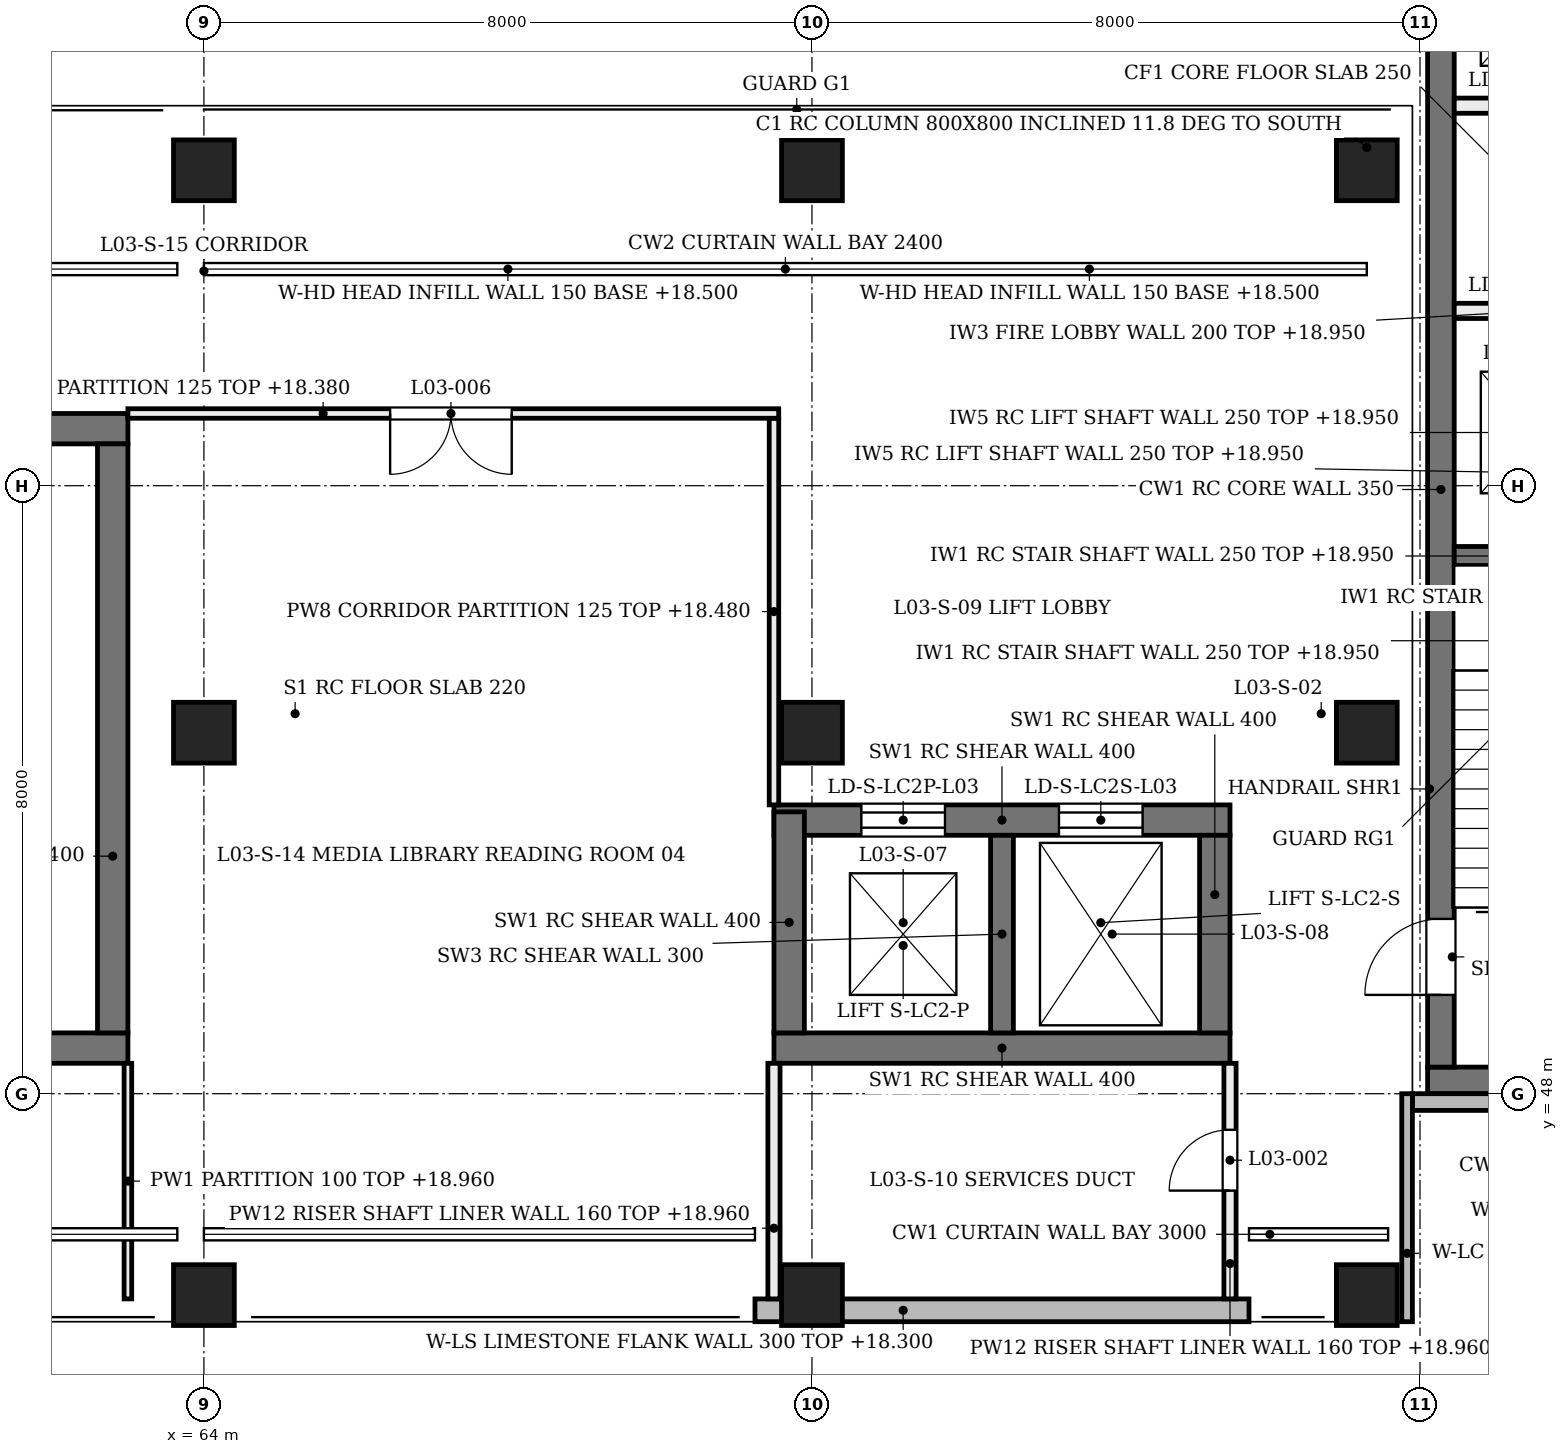
"""IFC4 building model, lengths in metres.
Left out: names, types, materials, properties, quantities, classifications, styles, units other than length and angle.
Written with IfcOpenShell. Run it as: python <this file> out.ifc"""

import sys

from ifc_helpers import new_model, si_unit, direction, frame, frame_2d, origin, origin_2d, place, context, subcontext, project, spatial, rectangle, extrude, element, fill, save


model = new_model("IFC4")
c1 = context("Model", 3, precision=1e-05, world=origin(), true_north=direction((0.0, 1.0)))
c2 = subcontext(c1, "Body", "Model", "MODEL_VIEW")
j1 = project(units=[si_unit("LENGTHUNIT", "METRE"), si_unit("PLANEANGLEUNIT", "RADIAN")], contexts=[c1])
p1 = place(None, origin())
s1 = spatial("IfcSite", under=j1, at=p1, CompositionType="ELEMENT")
p2 = place(p1, origin())
s2 = spatial("IfcBuilding", under=s1, at=p2, CompositionType="ELEMENT")
p3 = place(p2, frame((0.0, 0.0, 14.4)))
s3 = spatial("IfcBuildingStorey", under=s2, at=p3, CompositionType="ELEMENT", Elevation=14.4)
p4 = place(p3, frame((71.5, 48.6, 0.0), z_axis=(0.0, 0.0, 1.0), x_axis=(1.0, 0.0, 0.0)))
e1 = element("IfcWall", 1, at=p4, inside=s3, PredefinedType="SHEAR", context=c2, shape_type="SweptSolid", body=[
    extrude(rectangle(XDim=6.0, YDim=0.4, at=frame_2d((3.0, 0.0))), origin(), (0.0, 0.0, 1.0), 4.58),
])
p5 = place(p3, frame((71.5, 51.6, 0.0), z_axis=(0.0, 0.0, 1.0), x_axis=(1.0, 0.0, 0.0)))
e2 = element("IfcWall", 2, at=p5, inside=s3, PredefinedType="SHEAR", context=c2, shape_type="SweptSolid", body=[
    extrude(rectangle(XDim=6.0, YDim=0.4, at=frame_2d((3.0, 0.0))), origin(), (0.0, 0.0, 1.0), 4.58),
])
p6 = place(p5, frame((1.15, 0.0, 0.0)))
e3 = element("IfcOpeningElement", 3, at=p6, cuts=e2, PredefinedType="OPENING", context=c2, shape_type="SweptSolid", body=[
    extrude(rectangle(XDim=1.1, YDim=2.1, at=frame_2d((0.55, 1.05))), frame((0.0, 0.21, 0.0), z_axis=(0.0, -1.0, 0.0), x_axis=(1.0, 0.0, 0.0)), (0.0, 0.0, 1.0), 0.42),
])
p7 = place(p5, frame((3.75, 0.0, 0.0)))
e4 = element("IfcOpeningElement", 4, at=p7, cuts=e2, PredefinedType="OPENING", context=c2, shape_type="SweptSolid", body=[
    extrude(rectangle(XDim=1.1, YDim=2.1, at=frame_2d((0.55, 1.05))), frame((0.0, 0.21, 0.0), z_axis=(0.0, -1.0, 0.0), x_axis=(1.0, 0.0, 0.0)), (0.0, 0.0, 1.0), 0.42),
])
p8 = place(p3, frame((71.7, 48.8, 0.0), z_axis=(0.0, 0.0, 1.0), x_axis=(0.0, 1.0, 0.0)))
e5 = element("IfcWall", 5, at=p8, inside=s3, PredefinedType="SHEAR", context=c2, shape_type="SweptSolid", body=[
    extrude(rectangle(XDim=2.908, YDim=0.4, at=frame_2d((1.454, 0.0))), origin(), (0.0, 0.0, 1.0), 4.58),
])
p9 = place(p3, frame((77.3, 48.8, 0.0), z_axis=(0.0, 0.0, 1.0), x_axis=(0.0, 1.0, 0.0)))
e6 = element("IfcWall", 6, at=p9, inside=s3, PredefinedType="SHEAR", context=c2, shape_type="SweptSolid", body=[
    extrude(rectangle(XDim=2.6, YDim=0.4, at=frame_2d((1.3, 0.0))), origin(), (0.0, 0.0, 1.0), 4.58),
])
p10 = place(p3, frame((74.5, 48.8, 0.0), z_axis=(0.0, 0.0, 1.0), x_axis=(0.0, 1.0, 0.0)))
e7 = element("IfcWall", 7, at=p10, inside=s3, PredefinedType="SHEAR", context=c2, shape_type="SweptSolid", body=[
    extrude(rectangle(XDim=2.6, YDim=0.3, at=frame_2d((1.3, 0.0))), origin(), (0.0, 0.0, 1.0), 4.58),
])
p11 = place(p3, frame((41.0, 48.6, 0.0), z_axis=(0.0, 0.0, 1.0), x_axis=(1.0, 0.0, 0.0)))
e8 = element("IfcWall", 8, at=p11, inside=s3, PredefinedType="SHEAR", context=c2, shape_type="SweptSolid", body=[
    extrude(rectangle(XDim=22.0, YDim=0.4, at=frame_2d((11.0, 0.0))), origin(), (0.0, 0.0, 1.0), 4.58),
])
p12 = place(p3, frame((41.0, 56.75, 0.0), z_axis=(0.0, 0.0, 1.0), x_axis=(1.0, 0.0, 0.0)))
e9 = element("IfcWall", 9, at=p12, inside=s3, PredefinedType="SHEAR", context=c2, shape_type="SweptSolid", body=[
    extrude(rectangle(XDim=22.0, YDim=0.4, at=frame_2d((11.0, 0.0))), origin(), (0.0, 0.0, 1.0), 4.58),
])
p13 = place(p12, frame((10.366, 0.0, 0.0)))
e10 = element("IfcOpeningElement", 10, at=p13, cuts=e9, PredefinedType="OPENING", context=c2, shape_type="SweptSolid", body=[
    extrude(rectangle(XDim=1.5, YDim=2.1, at=frame_2d((0.75, 1.05))), frame((0.0, 0.21, 0.0), z_axis=(0.0, -1.0, 0.0), x_axis=(1.0, 0.0, 0.0)), (0.0, 0.0, 1.0), 0.42),
])
p14 = place(p3, frame((62.8, 48.8, 0.0), z_axis=(0.0, 0.0, 1.0), x_axis=(0.0, 1.0, 0.0)))
e11 = element("IfcWall", 11, at=p14, inside=s3, PredefinedType="SHEAR", context=c2, shape_type="SweptSolid", body=[
    extrude(rectangle(XDim=7.75, YDim=0.4, at=frame_2d((3.875, 0.0))), origin(), (0.0, 0.0, 1.0), 4.58),
])
p15 = place(p3, frame((80.1, 48.175, 0.0), z_axis=(0.0, 0.0, 1.0), x_axis=(1.0, 0.0, 0.0)))
e12 = element("IfcWall", 12, at=p15, inside=s3, PredefinedType="SHEAR", context=c2, shape_type="SweptSolid", body=[
    extrude(rectangle(XDim=7.95, YDim=0.35, at=frame_2d((3.975, 0.0))), origin(), (0.0, 0.0, 1.0), 4.58),
])
p16 = place(p3, frame((80.275, 48.35, 0.0), z_axis=(0.0, 0.0, 1.0), x_axis=(0.0, 1.0, 0.0)))
e13 = element("IfcWall", 13, at=p16, inside=s3, PredefinedType="SHEAR", context=c2, shape_type="SweptSolid", body=[
    extrude(rectangle(XDim=15.2, YDim=0.35, at=frame_2d((7.6, 0.0))), origin(), (0.0, 0.0, 1.0), 4.58),
])
p17 = place(p16, frame((0.95, 0.0, 0.0)))
e14 = element("IfcOpeningElement", 14, at=p17, cuts=e13, PredefinedType="OPENING", context=c2, shape_type="SweptSolid", body=[
    extrude(rectangle(XDim=1.0, YDim=2.1, at=frame_2d((0.5, 1.05))), frame((0.0, 0.185, 0.0), z_axis=(0.0, -1.0, 0.0), x_axis=(1.0, 0.0, 0.0)), (0.0, 0.0, 1.0), 0.37),
])
for number, where, z_axis, x_axis in (
    (15, (64.0, 45.6, 0.0), (0.0, -0.204, 0.979), (1.0, 0.0, 0.0)),
    (16, (72.0, 45.6, 0.0), (0.0, -0.204, 0.979), (1.0, 0.0, 0.0)),
    (17, (79.3, 45.6, 0.0), (0.0, -0.204, 0.979), (1.0, 0.0, 0.0)),
    (18, (64.0, 53.0, 0.0), (0.0, -0.204, 0.979), (1.0, 0.0, 0.0)),
    (19, (72.0, 53.0, 0.0), (0.0, -0.204, 0.979), (1.0, 0.0, 0.0)),
    (20, (79.3, 53.0, 0.0), (0.0, -0.204, 0.979), (1.0, 0.0, 0.0)),
    (21, (64.0, 60.4, 0.0), (0.0, -0.204, 0.979), (1.0, 0.0, 0.0)),
    (22, (72.0, 60.4, 0.0), (0.0, -0.204, 0.979), (1.0, 0.0, 0.0)),
    (23, (79.3, 60.4, 0.0), (0.0, -0.204, 0.979), (1.0, 0.0, 0.0)),
):
    element("IfcColumn", number, at=place(p3, frame(where, z_axis=z_axis, x_axis=x_axis)), inside=s3, PredefinedType="COLUMN", context=c2, shape_type="SweptSolid", body=[
        extrude(rectangle(XDim=0.8, YDim=0.8, at=origin_2d()), origin(), (0.0, 0.0, 1.0), 4.903),
    ])
p18 = place(p3, frame((71.25, 45.15, 0.0), z_axis=(0.0, 0.0, 1.0), x_axis=(1.0, 0.0, 0.0)))
e24 = element("IfcWall", 24, at=p18, inside=s3, PredefinedType="SOLIDWALL", context=c2, shape_type="SweptSolid", body=[
    extrude(rectangle(XDim=6.5, YDim=0.3, at=frame_2d((3.25, 0.0))), origin(), (0.0, 0.0, 1.0), 3.9),
])
p19 = place(p3, frame((64.2, 58.85, 4.1), z_axis=(0.0, 0.0, 1.0), x_axis=(1.0, 0.0, 0.0)))
e25 = element("IfcWall", 25, at=p19, inside=s3, PredefinedType="SOLIDWALL", context=c2, shape_type="SweptSolid", body=[
    extrude(rectangle(XDim=7.6, YDim=0.15, at=frame_2d((3.8, 0.0))), origin(), (0.0, 0.0, 1.0), 0.48),
])
p20 = place(p3, frame((72.2, 58.85, 4.1), z_axis=(0.0, 0.0, 1.0), x_axis=(1.0, 0.0, 0.0)))
e26 = element("IfcWall", 26, at=p20, inside=s3, PredefinedType="SOLIDWALL", context=c2, shape_type="SweptSolid", body=[
    extrude(rectangle(XDim=6.9, YDim=0.15, at=frame_2d((3.45, 0.0))), origin(), (0.0, 0.0, 1.0), 0.48),
])
p21 = place(p3, frame((79.9, 47.89, 0.0), z_axis=(0.0, 0.0, 1.0), x_axis=(1.0, 0.0, 0.0)))
e27 = element("IfcWall", 27, at=p21, inside=s3, PredefinedType="SOLIDWALL", context=c2, shape_type="SweptSolid", body=[
    extrude(rectangle(XDim=8.2, YDim=0.22, at=frame_2d((4.1, 0.0))), origin(), (0.0, 0.0, 1.0), 3.9),
])
p22 = place(p21, frame((1.308, 0.0, 0.9)))
e28 = element("IfcOpeningElement", 28, at=p22, cuts=e27, PredefinedType="OPENING", context=c2, shape_type="SweptSolid", body=[
    extrude(rectangle(XDim=0.45, YDim=2.6, at=frame_2d((0.225, 1.3))), frame((0.0, 0.12, 0.0), z_axis=(0.0, -1.0, 0.0), x_axis=(1.0, 0.0, 0.0)), (0.0, 0.0, 1.0), 0.24),
])
p23 = place(p21, frame((3.975, 0.0, 0.9)))
e29 = element("IfcOpeningElement", 29, at=p23, cuts=e27, PredefinedType="OPENING", context=c2, shape_type="SweptSolid", body=[
    extrude(rectangle(XDim=0.45, YDim=2.6, at=frame_2d((0.225, 1.3))), frame((0.0, 0.12, 0.0), z_axis=(0.0, -1.0, 0.0), x_axis=(1.0, 0.0, 0.0)), (0.0, 0.0, 1.0), 0.24),
])
p24 = place(p21, frame((6.642, 0.0, 0.9)))
e30 = element("IfcOpeningElement", 30, at=p24, cuts=e27, PredefinedType="OPENING", context=c2, shape_type="SweptSolid", body=[
    extrude(rectangle(XDim=0.45, YDim=2.6, at=frame_2d((0.225, 1.3))), frame((0.0, 0.12, 0.0), z_axis=(0.0, -1.0, 0.0), x_axis=(1.0, 0.0, 0.0)), (0.0, 0.0, 1.0), 0.24),
])
p25 = place(p3, frame((79.83, 45.0, 0.0), z_axis=(0.0, 0.0, 1.0), x_axis=(0.0, 1.0, 0.0)))
e31 = element("IfcWall", 31, at=p25, inside=s3, PredefinedType="SOLIDWALL", context=c2, shape_type="SweptSolid", body=[
    extrude(rectangle(XDim=3.0, YDim=0.14, at=frame_2d((1.5, 0.0))), origin(), (0.0, 0.0, 1.0), 3.9),
])
p26 = place(p3, frame((83.55, 55.075, 0.0), z_axis=(0.0, 0.0, 1.0), x_axis=(-1.0, 0.0, 0.0)))
e32 = element("IfcWall", 32, at=p26, inside=s3, PredefinedType="SOLIDWALL", context=c2, shape_type="SweptSolid", body=[
    extrude(rectangle(XDim=3.1, YDim=0.25, at=frame_2d((1.55, 0.0))), origin(), (0.0, 0.0, 1.0), 4.55),
])
p27 = place(p3, frame((87.65, 58.3, 0.0), z_axis=(0.0, 0.0, 1.0), x_axis=(-1.0, 0.0, 0.0)))
e33 = element("IfcWall", 33, at=p27, inside=s3, PredefinedType="SOLIDWALL", context=c2, shape_type="SweptSolid", body=[
    extrude(rectangle(XDim=7.2, YDim=0.2, at=frame_2d((3.6, 0.0))), origin(), (0.0, 0.0, 1.0), 4.55),
])
p28 = place(p27, frame((0.5, 0.0, 0.0)))
e34 = element("IfcOpeningElement", 34, at=p28, cuts=e33, PredefinedType="OPENING", context=c2, shape_type="SweptSolid", body=[
    extrude(rectangle(XDim=1.1, YDim=2.1, at=frame_2d((0.55, 1.05))), frame((0.0, 0.11, 0.0), z_axis=(0.0, -1.0, 0.0), x_axis=(1.0, 0.0, 0.0)), (0.0, 0.0, 1.0), 0.22),
])
p29 = place(p27, frame((5.6, 0.0, 0.0)))
e35 = element("IfcOpeningElement", 35, at=p29, cuts=e33, PredefinedType="OPENING", context=c2, shape_type="SweptSolid", body=[
    extrude(rectangle(XDim=1.1, YDim=2.1, at=frame_2d((0.55, 1.05))), frame((0.0, 0.11, 0.0), z_axis=(0.0, -1.0, 0.0), x_axis=(1.0, 0.0, 0.0)), (0.0, 0.0, 1.0), 0.22),
])
p30 = place(p27, frame((3.1, 0.0, 0.0)))
e36 = element("IfcOpeningElement", 36, at=p30, cuts=e33, PredefinedType="OPENING", context=c2, shape_type="SweptSolid", body=[
    extrude(rectangle(XDim=1.0, YDim=2.1, at=frame_2d((0.5, 1.05))), frame((0.0, 0.11, 0.0), z_axis=(0.0, -1.0, 0.0), x_axis=(1.0, 0.0, 0.0)), (0.0, 0.0, 1.0), 0.22),
])
p31 = place(p3, frame((87.65, 61.0, 0.0), z_axis=(0.0, 0.0, 1.0), x_axis=(-1.0, 0.0, 0.0)))
e37 = element("IfcWall", 37, at=p31, inside=s3, PredefinedType="SOLIDWALL", context=c2, shape_type="SweptSolid", body=[
    extrude(rectangle(XDim=7.2, YDim=0.2, at=frame_2d((3.6, 0.0))), origin(), (0.0, 0.0, 1.0), 4.55),
])
p32 = place(p31, frame((0.5, 0.0, 0.0)))
e38 = element("IfcOpeningElement", 38, at=p32, cuts=e37, PredefinedType="OPENING", context=c2, shape_type="SweptSolid", body=[
    extrude(rectangle(XDim=1.1, YDim=2.1, at=frame_2d((0.55, 1.05))), frame((0.0, 0.11, 0.0), z_axis=(0.0, -1.0, 0.0), x_axis=(1.0, 0.0, 0.0)), (0.0, 0.0, 1.0), 0.22),
])
p33 = place(p31, frame((5.6, 0.0, 0.0)))
e39 = element("IfcOpeningElement", 39, at=p33, cuts=e37, PredefinedType="OPENING", context=c2, shape_type="SweptSolid", body=[
    extrude(rectangle(XDim=1.1, YDim=2.1, at=frame_2d((0.55, 1.05))), frame((0.0, 0.11, 0.0), z_axis=(0.0, -1.0, 0.0), x_axis=(1.0, 0.0, 0.0)), (0.0, 0.0, 1.0), 0.22),
])
p34 = place(p31, frame((3.1, 0.0, 0.0)))
e40 = element("IfcOpeningElement", 40, at=p34, cuts=e37, PredefinedType="OPENING", context=c2, shape_type="SweptSolid", body=[
    extrude(rectangle(XDim=1.0, YDim=2.1, at=frame_2d((0.5, 1.05))), frame((0.0, 0.11, 0.0), z_axis=(0.0, -1.0, 0.0), x_axis=(1.0, 0.0, 0.0)), (0.0, 0.0, 1.0), 0.22),
])
p35 = place(p3, frame((77.5, 45.3, 0.0), z_axis=(0.0, 0.0, 1.0), x_axis=(0.0, 1.0, 0.0)))
e41 = element("IfcWall", 41, at=p35, inside=s3, PredefinedType="PARTITIONING", context=c2, shape_type="SweptSolid", body=[
    extrude(rectangle(XDim=3.1, YDim=0.16, at=frame_2d((1.55, 0.0))), origin(), (0.0, 0.0, 1.0), 4.56),
])
p36 = place(p35, frame((1.425, 0.0, 0.0)))
e42 = element("IfcOpeningElement", 42, at=p36, cuts=e41, PredefinedType="OPENING", context=c2, shape_type="SweptSolid", body=[
    extrude(rectangle(XDim=0.8, YDim=2.1, at=frame_2d((0.4, 1.05))), frame((0.0, 0.09, 0.0), z_axis=(0.0, -1.0, 0.0), x_axis=(1.0, 0.0, 0.0)), (0.0, 0.0, 1.0), 0.18),
])
p37 = place(p3, frame((71.5, 45.3, 0.0), z_axis=(0.0, 0.0, 1.0), x_axis=(0.0, 1.0, 0.0)))
e43 = element("IfcWall", 43, at=p37, inside=s3, PredefinedType="PARTITIONING", context=c2, shape_type="SweptSolid", body=[
    extrude(rectangle(XDim=3.1, YDim=0.16, at=frame_2d((1.55, 0.0))), origin(), (0.0, 0.0, 1.0), 4.56),
])
p38 = place(p3, frame((71.5, 51.8, 0.0), z_axis=(0.0, 0.0, 1.0), x_axis=(0.0, 1.0, 0.0)))
e44 = element("IfcWall", 44, at=p38, inside=s3, PredefinedType="PARTITIONING", context=c2, shape_type="SweptSolid", body=[
    extrude(rectangle(XDim=5.087, YDim=0.125, at=frame_2d((2.544, 0.0))), origin(), (0.0, 0.0, 1.0), 4.08),
])
p39 = place(p3, frame((63.0, 45.3, 0.0), z_axis=(0.0, 0.0, 1.0), x_axis=(0.0, 1.0, 0.0)))
e45 = element("IfcWall", 45, at=p39, inside=s3, PredefinedType="PARTITIONING", context=c2, shape_type="SweptSolid", body=[
    extrude(rectangle(XDim=3.1, YDim=0.1, at=frame_2d((1.55, 0.0))), origin(), (0.0, 0.0, 1.0), 4.56),
])
p40 = place(p3, frame((63.0, 56.95, 0.0), z_axis=(0.0, 0.0, 1.0), x_axis=(1.0, 0.0, 0.0)))
e46 = element("IfcWall", 46, at=p40, inside=s3, PredefinedType="PARTITIONING", context=c2, shape_type="SweptSolid", body=[
    extrude(rectangle(XDim=8.562, YDim=0.125, at=frame_2d((4.281, 0.0))), origin(), (0.0, 0.0, 1.0), 3.98),
])
p41 = place(p40, frame((3.45, 0.0, 0.0)))
e47 = element("IfcOpeningElement", 47, at=p41, cuts=e46, PredefinedType="OPENING", context=c2, shape_type="SweptSolid", body=[
    extrude(rectangle(XDim=1.6, YDim=2.2, at=frame_2d((0.8, 1.1))), frame((0.0, 0.073, 0.0), z_axis=(0.0, -1.0, 0.0), x_axis=(1.0, 0.0, 0.0)), (0.0, 0.0, 1.0), 0.145),
])
p42 = place(p17, origin())
e48 = element("IfcDoor", 48, at=p42, inside=s3, OperationType="SINGLE_SWING_LEFT", PredefinedType="DOOR", context=c2, shape_type="SweptSolid", body=[
    extrude(rectangle(XDim=1.0, YDim=2.1, at=frame_2d((0.5, 1.05))), frame((0.0, 0.025, 0.0), z_axis=(0.0, -1.0, 0.0), x_axis=(1.0, 0.0, 0.0)), (0.0, 0.0, 1.0), 0.05),
])
fill(e14, e48)
p43 = place(p6, origin())
e49 = element("IfcDoor", 49, at=p43, inside=s3, OperationType="DOUBLE_DOOR_SLIDING", PredefinedType="DOOR", context=c2, shape_type="SweptSolid", body=[
    extrude(rectangle(XDim=1.1, YDim=2.1, at=frame_2d((0.55, 1.05))), frame((0.0, 0.025, 0.0), z_axis=(0.0, -1.0, 0.0), x_axis=(1.0, 0.0, 0.0)), (0.0, 0.0, 1.0), 0.05),
])
fill(e3, e49)
p44 = place(p7, origin())
e50 = element("IfcDoor", 50, at=p44, inside=s3, OperationType="DOUBLE_DOOR_SLIDING", PredefinedType="DOOR", context=c2, shape_type="SweptSolid", body=[
    extrude(rectangle(XDim=1.1, YDim=2.1, at=frame_2d((0.55, 1.05))), frame((0.0, 0.025, 0.0), z_axis=(0.0, -1.0, 0.0), x_axis=(1.0, 0.0, 0.0)), (0.0, 0.0, 1.0), 0.05),
])
fill(e4, e50)
p45 = place(p36, origin())
e51 = element("IfcDoor", 51, at=p45, inside=s3, OperationType="SINGLE_SWING_LEFT", PredefinedType="DOOR", context=c2, shape_type="SweptSolid", body=[
    extrude(rectangle(XDim=0.8, YDim=2.1, at=frame_2d((0.4, 1.05))), frame((0.0, 0.025, 0.0), z_axis=(0.0, -1.0, 0.0), x_axis=(1.0, 0.0, 0.0)), (0.0, 0.0, 1.0), 0.05),
])
fill(e42, e51)
p46 = place(p41, frame((1.6, 0.0, 0.0), z_axis=(0.0, 0.0, 1.0), x_axis=(-1.0, 0.0, 0.0)))
e52 = element("IfcDoor", 52, at=p46, inside=s3, OperationType="DOUBLE_DOOR_SINGLE_SWING", PredefinedType="DOOR", context=c2, shape_type="SweptSolid", body=[
    extrude(rectangle(XDim=1.6, YDim=2.2, at=frame_2d((0.8, 1.1))), frame((0.0, 0.025, 0.0), z_axis=(0.0, -1.0, 0.0), x_axis=(1.0, 0.0, 0.0)), (0.0, 0.0, 1.0), 0.05),
])
fill(e47, e52)
save(model, sys.argv[1])
